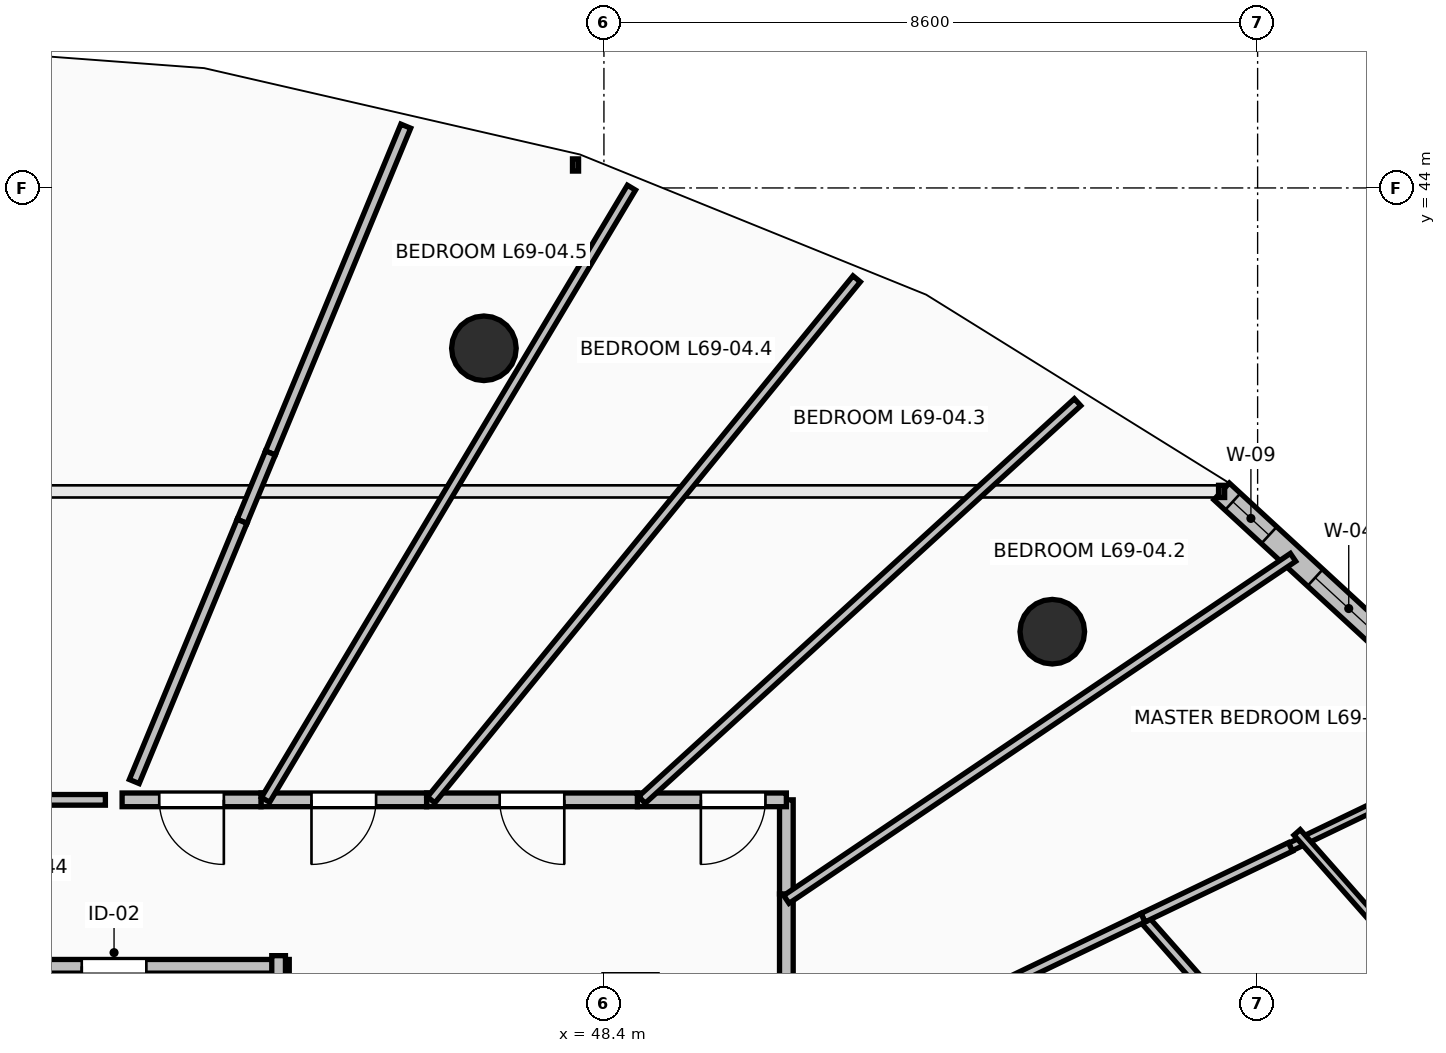
"""IFC4 building model, lengths in metres.
Left out: names, types, materials, properties, quantities, classifications, styles, units other than length and angle.
Written with IfcOpenShell. Run it as: python <this file> out.ifc"""

import sys

from ifc_helpers import new_model, si_unit, direction, frame, frame_2d, origin, origin_2d, place, context, subcontext, project, spatial, rectangle, circle, extrude, element, fill, save


model = new_model("IFC4")
c1 = context("Model", 3, precision=1e-05, world=origin(), true_north=direction((0.0, 1.0)))
c2 = subcontext(c1, "Body", "Model", "MODEL_VIEW")
j1 = project(units=[si_unit("LENGTHUNIT", "METRE"), si_unit("PLANEANGLEUNIT", "RADIAN")], contexts=[c1])
p1 = place(None, origin())
s1 = spatial("IfcSite", under=j1, at=p1, CompositionType="ELEMENT")
p2 = place(p1, origin())
s2 = spatial("IfcBuilding", under=s1, at=p2, CompositionType="ELEMENT")
p3 = place(p2, frame((0.0, 0.0, 255.55)))
s3 = spatial("IfcBuildingStorey", under=s2, at=p3, CompositionType="ELEMENT", Elevation=255.55)
for number, where, z_axis, x_axis in (
    (1, (54.299, 38.162, 0.0), (0.0, 0.0, 1.0), (0.707, 0.707, 0.0)),
    (2, (46.821, 41.891, 0.0), (0.0, 0.0, 1.0), (0.383, 0.924, 0.0)),
):
    element("IfcColumn", number, at=place(p3, frame(where, z_axis=z_axis, x_axis=x_axis)), inside=s3, PredefinedType="COLUMN", context=c2, shape_type="SweptSolid", body=[
        extrude(circle(Radius=0.425, at=origin_2d()), origin(), (0.0, 0.0, 1.0), 3.55),
    ])
p4 = place(p3, frame((59.784, 37.006, 0.0), z_axis=(0.0, 0.0, 1.0), x_axis=(-0.735445373611, 0.677584018727, 0.0)))
e3 = element("IfcWall", 3, at=p4, inside=s3, PredefinedType="STANDARD", context=c2, shape_type="SweptSolid", body=[
    extrude(rectangle(XDim=4.43, YDim=0.3, at=frame_2d((2.215, 0.0))), origin(), (0.0, 0.0, 1.0), 3.29),
])
p5 = place(p4, frame((1.556, 0.0, 0.85)))
e4 = element("IfcOpeningElement", 4, at=p5, cuts=e3, PredefinedType="OPENING", context=c2, shape_type="SweptSolid", body=[
    extrude(rectangle(XDim=1.2, YDim=1.95, at=frame_2d((0.6, 0.975))), frame((0.0, 0.165, 0.0), z_axis=(0.0, -1.0, 0.0), x_axis=(1.0, 0.0, 0.0)), (0.0, 0.0, 1.0), 0.33),
])
p6 = place(p4, frame((3.581, 0.0, 0.85)))
e5 = element("IfcOpeningElement", 5, at=p6, cuts=e3, PredefinedType="OPENING", context=c2, shape_type="SweptSolid", body=[
    extrude(rectangle(XDim=0.65, YDim=1.8, at=frame_2d((0.325, 0.9))), frame((0.0, 0.165, 0.0), z_axis=(0.0, -1.0, 0.0), x_axis=(1.0, 0.0, 0.0)), (0.0, 0.0, 1.0), 0.33),
])
p7 = place(p3, frame((44.26, 33.76, 0.0), z_axis=(0.0, 0.0, 1.0), x_axis=(-1.0, 0.0, 0.0)))
e6 = element("IfcWall", 6, at=p7, inside=s3, PredefinedType="PARTITIONING", context=c2, shape_type="SweptSolid", body=[
    extrude(rectangle(XDim=4.61, YDim=0.18, at=frame_2d((2.305, 0.0))), origin(), (0.0, 0.0, 1.0), 3.29),
])
p8 = place(p7, frame((1.88, 0.0, 0.0)))
e7 = element("IfcOpeningElement", 7, at=p8, cuts=e6, PredefinedType="OPENING", context=c2, shape_type="SweptSolid", body=[
    extrude(rectangle(XDim=0.85, YDim=2.1, at=frame_2d((0.425, 1.05))), frame((0.0, 0.105, 0.0), z_axis=(0.0, -1.0, 0.0), x_axis=(1.0, 0.0, 0.0)), (0.0, 0.0, 1.0), 0.21),
])
p9 = place(p3, frame((44.12, 32.97, 0.0), z_axis=(0.0, 0.0, 1.0), x_axis=(0.0, 1.0, 0.0)))
e8 = element("IfcWall", 8, at=p9, inside=s3, PredefinedType="PARTITIONING", context=c2, shape_type="SweptSolid", body=[
    extrude(rectangle(XDim=0.93, YDim=0.18, at=frame_2d((0.465, 0.0))), origin(), (0.0, 0.0, 1.0), 3.29),
])
p10 = place(p3, frame((50.8, 32.213, 0.0), z_axis=(0.0, 0.0, 1.0), x_axis=(0.0, 1.0, 0.0)))
e9 = element("IfcWall", 9, at=p10, inside=s3, PredefinedType="PARTITIONING", context=c2, shape_type="SweptSolid", body=[
    extrude(rectangle(XDim=2.499, YDim=0.18, at=frame_2d((1.25, 0.0))), origin(), (0.0, 0.0, 1.0), 2.482),
])
p11 = place(p3, frame((50.8, 34.712, 0.0), z_axis=(0.0, 0.0, 1.0), x_axis=(0.0, 1.0, 0.0)))
e10 = element("IfcWall", 10, at=p11, inside=s3, PredefinedType="PARTITIONING", context=c2, shape_type="SweptSolid", body=[
    extrude(rectangle(XDim=1.238, YDim=0.18, at=frame_2d((0.619, 0.0))), origin(), (0.0, 0.0, 1.0), 2.482),
])
p12 = place(p3, frame((50.8, 35.95, 0.0), z_axis=(0.0, 0.0, 1.0), x_axis=(-1.0, 0.0, 0.0)))
e11 = element("IfcWall", 11, at=p12, inside=s3, PredefinedType="PARTITIONING", context=c2, shape_type="SweptSolid", body=[
    extrude(rectangle(XDim=1.96, YDim=0.18, at=frame_2d((0.98, 0.0))), origin(), (0.0, 0.0, 1.0), 2.936),
])
p13 = place(p12, frame((0.275, 0.0, 0.0)))
e12 = element("IfcOpeningElement", 12, at=p13, cuts=e11, PredefinedType="OPENING", context=c2, shape_type="SweptSolid", body=[
    extrude(rectangle(XDim=0.85, YDim=2.1, at=frame_2d((0.425, 1.05))), frame((0.0, 0.105, 0.0), z_axis=(0.0, -1.0, 0.0), x_axis=(1.0, 0.0, 0.0)), (0.0, 0.0, 1.0), 0.21),
])
p14 = place(p3, frame((48.84, 35.95, 0.0), z_axis=(0.0, 0.0, 1.0), x_axis=(-1.0, 0.0, 0.0)))
e13 = element("IfcWall", 13, at=p14, inside=s3, PredefinedType="PARTITIONING", context=c2, shape_type="SweptSolid", body=[
    extrude(rectangle(XDim=2.773, YDim=0.18, at=frame_2d((1.387, 0.0))), origin(), (0.0, 0.0, 1.0), 2.482),
])
p15 = place(p14, frame((0.961, 0.0, 0.0)))
e14 = element("IfcOpeningElement", 14, at=p15, cuts=e13, PredefinedType="OPENING", context=c2, shape_type="SweptSolid", body=[
    extrude(rectangle(XDim=0.85, YDim=2.1, at=frame_2d((0.425, 1.05))), frame((0.0, 0.105, 0.0), z_axis=(0.0, -1.0, 0.0), x_axis=(1.0, 0.0, 0.0)), (0.0, 0.0, 1.0), 0.21),
])
p16 = place(p3, frame((46.067, 35.95, 0.0), z_axis=(0.0, 0.0, 1.0), x_axis=(-1.0, 0.0, 0.0)))
e15 = element("IfcWall", 15, at=p16, inside=s3, PredefinedType="PARTITIONING", context=c2, shape_type="SweptSolid", body=[
    extrude(rectangle(XDim=2.179, YDim=0.18, at=frame_2d((1.089, 0.0))), origin(), (0.0, 0.0, 1.0), 3.29),
])
p17 = place(p16, frame((0.665, 0.0, 0.0)))
e16 = element("IfcOpeningElement", 16, at=p17, cuts=e15, PredefinedType="OPENING", context=c2, shape_type="SweptSolid", body=[
    extrude(rectangle(XDim=0.85, YDim=2.1, at=frame_2d((0.425, 1.05))), frame((0.0, 0.105, 0.0), z_axis=(0.0, -1.0, 0.0), x_axis=(1.0, 0.0, 0.0)), (0.0, 0.0, 1.0), 0.21),
])
p18 = place(p3, frame((43.888, 35.95, 0.0), z_axis=(0.0, 0.0, 1.0), x_axis=(-1.0, 0.0, 0.0)))
e17 = element("IfcWall", 17, at=p18, inside=s3, PredefinedType="PARTITIONING", context=c2, shape_type="SweptSolid", body=[
    extrude(rectangle(XDim=1.827, YDim=0.18, at=frame_2d((0.914, 0.0))), origin(), (0.0, 0.0, 1.0), 3.29),
])
p19 = place(p18, frame((0.489, 0.0, 0.0)))
e18 = element("IfcOpeningElement", 18, at=p19, cuts=e17, PredefinedType="OPENING", context=c2, shape_type="SweptSolid", body=[
    extrude(rectangle(XDim=0.85, YDim=2.1, at=frame_2d((0.425, 1.05))), frame((0.0, 0.105, 0.0), z_axis=(0.0, -1.0, 0.0), x_axis=(1.0, 0.0, 0.0)), (0.0, 0.0, 1.0), 0.21),
])
p20 = place(p3, frame((57.432, 35.33, 0.0), z_axis=(0.0, 0.0, 1.0), x_axis=(0.90133305384, 0.43312668592, 0.0)))
e19 = element("IfcWall", 19, at=p20, inside=s3, PredefinedType="PARTITIONING", context=c2, shape_type="SweptSolid", body=[
    extrude(rectangle(XDim=3.069, YDim=0.11, at=frame_2d((1.535, 0.0))), origin(), (0.0, 0.0, 1.0), 3.29),
])
p21 = place(p3, frame((57.512, 32.112, 0.0), z_axis=(0.0, 0.0, 1.0), x_axis=(-0.662026430628, 0.749480490173, 0.0)))
e20 = element("IfcWall", 20, at=p21, inside=s3, PredefinedType="PARTITIONING", context=c2, shape_type="SweptSolid", body=[
    extrude(rectangle(XDim=3.051, YDim=0.125, at=frame_2d((1.526, 0.0))), origin(), (0.0, 0.0, 1.0), 2.482),
])
p22 = place(p21, frame((1.076, 0.0, 0.0)))
e21 = element("IfcOpeningElement", 21, at=p22, cuts=e20, PredefinedType="OPENING", context=c2, shape_type="SweptSolid", body=[
    extrude(rectangle(XDim=0.9, YDim=2.1, at=frame_2d((0.45, 1.05))), frame((0.0, 0.077, 0.0), z_axis=(0.0, -1.0, 0.0), x_axis=(1.0, 0.0, 0.0)), (0.0, 0.0, 1.0), 0.155),
])
p23 = place(p3, frame((55.492, 34.399, 0.0), z_axis=(0.0, 0.0, 1.0), x_axis=(0.901372521065, 0.433044545363, 0.0)))
e22 = element("IfcWall", 22, at=p23, inside=s3, PredefinedType="PARTITIONING", context=c2, shape_type="SweptSolid", body=[
    extrude(rectangle(XDim=2.152, YDim=0.125, at=frame_2d((1.076, 0.0))), origin(), (0.0, 0.0, 1.0), 2.874),
])
p24 = place(p3, frame((55.492, 34.399, 0.0), z_axis=(0.0, 0.0, 1.0), x_axis=(-0.901416162018, -0.432953695968, 0.0)))
e23 = element("IfcWall", 23, at=p24, inside=s3, PredefinedType="PARTITIONING", context=c2, shape_type="SweptSolid", body=[
    extrude(rectangle(XDim=5.205, YDim=0.125, at=frame_2d((2.603, 0.0))), origin(), (0.0, 0.0, 1.0), 2.482),
])
p25 = place(p24, frame((2.152, 0.0, 0.0)))
e24 = element("IfcOpeningElement", 24, at=p25, cuts=e23, PredefinedType="OPENING", context=c2, shape_type="SweptSolid", body=[
    extrude(rectangle(XDim=0.9, YDim=2.1, at=frame_2d((0.45, 1.05))), frame((0.0, 0.077, 0.0), z_axis=(0.0, -1.0, 0.0), x_axis=(1.0, 0.0, 0.0)), (0.0, 0.0, 1.0), 0.155),
])
p26 = place(p3, frame((57.519, 35.522, 0.0), z_axis=(0.0, 0.0, 1.0), x_axis=(0.662055665853, -0.749454665281, 0.0)))
e25 = element("IfcWall", 25, at=p26, inside=s3, PredefinedType="PARTITIONING", context=c2, shape_type="SweptSolid", body=[
    extrude(rectangle(XDim=3.701, YDim=0.11, at=frame_2d((1.851, 0.0))), origin(), (0.0, 0.0, 1.0), 3.29),
])
p27 = place(p3, frame((57.466, 39.14, 0.0), z_axis=(0.0, 0.0, 1.0), x_axis=(-0.828823335801, -0.559510391352, 0.0)))
e26 = element("IfcWall", 26, at=p27, inside=s3, PredefinedType="PARTITIONING", context=c2, shape_type="SweptSolid", body=[
    extrude(rectangle(XDim=8.043, YDim=0.125, at=frame_2d((4.021, 0.0))), origin(), (0.0, 0.0, 1.0), 2.482),
])
p28 = place(p3, frame((54.631, 41.181, 0.0), z_axis=(0.0, 0.0, 1.0), x_axis=(-0.73860604902, -0.674137303783, 0.0)))
e27 = element("IfcWall", 27, at=p28, inside=s3, PredefinedType="PARTITIONING", context=c2, shape_type="SweptSolid", body=[
    extrude(rectangle(XDim=7.76, YDim=0.125, at=frame_2d((3.88, 0.0))), origin(), (0.0, 0.0, 1.0), 2.874),
])
p29 = place(p3, frame((51.725, 42.804, 0.0), z_axis=(0.0, 0.0, 1.0), x_axis=(-0.632582563989, -0.774492930721, 0.0)))
e28 = element("IfcWall", 28, at=p29, inside=s3, PredefinedType="PARTITIONING", context=c2, shape_type="SweptSolid", body=[
    extrude(rectangle(XDim=8.85, YDim=0.125, at=frame_2d((4.425, 0.0))), origin(), (0.0, 0.0, 1.0), 2.482),
])
p30 = place(p3, frame((48.762, 44.004, 0.0), z_axis=(0.0, 0.0, 1.0), x_axis=(-0.51305247577, -0.858357243289, 0.0)))
e29 = element("IfcWall", 29, at=p30, inside=s3, PredefinedType="PARTITIONING", context=c2, shape_type="SweptSolid", body=[
    extrude(rectangle(XDim=9.383, YDim=0.125, at=frame_2d((4.691, 0.0))), origin(), (0.0, 0.0, 1.0), 2.482),
])
p31 = place(p3, frame((41.841, 35.95, 0.0), z_axis=(0.0, 0.0, 1.0), x_axis=(-1.0, 0.0, 0.0)))
e30 = element("IfcWall", 30, at=p31, inside=s3, PredefinedType="PARTITIONING", context=c2, shape_type="SweptSolid", body=[
    extrude(rectangle(XDim=2.391, YDim=0.14, at=frame_2d((1.196, 0.0))), origin(), (0.0, 0.0, 1.0), 3.29),
])
p32 = place(p3, frame((45.793, 44.813, 0.0), z_axis=(0.0, 0.0, 1.0), x_axis=(-0.382733290986, -0.923858878818, 0.0)))
e31 = element("IfcWall", 31, at=p32, inside=s3, PredefinedType="PARTITIONING", context=c2, shape_type="SweptSolid", body=[
    extrude(rectangle(XDim=4.653, YDim=0.14, at=frame_2d((2.327, 0.0))), origin(), (0.0, 0.0, 1.0), 2.874),
])
p33 = place(p3, frame((44.012, 40.514, 0.0), z_axis=(0.0, 0.0, 1.0), x_axis=(-0.382941999237, -0.923772388211, 0.0)))
e32 = element("IfcWall", 32, at=p33, inside=s3, PredefinedType="PARTITIONING", context=c2, shape_type="SweptSolid", body=[
    extrude(rectangle(XDim=0.974, YDim=0.14, at=frame_2d((0.487, 0.0))), origin(), (0.0, 0.0, 1.0), 3.29),
])
p34 = place(p3, frame((43.639, 39.614, 0.0), z_axis=(0.0, 0.0, 1.0), x_axis=(-0.38270095978, -0.923872272224, 0.0)))
e33 = element("IfcWall", 33, at=p34, inside=s3, PredefinedType="PARTITIONING", context=c2, shape_type="SweptSolid", body=[
    extrude(rectangle(XDim=3.705, YDim=0.14, at=frame_2d((1.853, 0.0))), origin(), (0.0, 0.0, 1.0), 2.936),
])
p35 = place(p5, origin())
e34 = element("IfcWindow", 34, at=p35, inside=s3, PartitioningType="SINGLE_PANEL", PredefinedType="WINDOW", context=c2, shape_type="SweptSolid", body=[
    extrude(rectangle(XDim=1.2, YDim=1.95, at=frame_2d((0.6, 0.975))), frame((0.0, 0.03, 0.0), z_axis=(0.0, -1.0, 0.0), x_axis=(1.0, 0.0, 0.0)), (0.0, 0.0, 1.0), 0.06),
])
fill(e4, e34)
p36 = place(p6, origin())
e35 = element("IfcWindow", 35, at=p36, inside=s3, PartitioningType="SINGLE_PANEL", PredefinedType="WINDOW", context=c2, shape_type="SweptSolid", body=[
    extrude(rectangle(XDim=0.65, YDim=1.8, at=frame_2d((0.325, 0.9))), frame((0.0, 0.03, 0.0), z_axis=(0.0, -1.0, 0.0), x_axis=(1.0, 0.0, 0.0)), (0.0, 0.0, 1.0), 0.06),
])
fill(e5, e35)
p37 = place(p8, origin())
e36 = element("IfcDoor", 36, at=p37, inside=s3, OperationType="SINGLE_SWING_RIGHT", PredefinedType="DOOR", context=c2, shape_type="SweptSolid", body=[
    extrude(rectangle(XDim=0.85, YDim=2.1, at=frame_2d((0.425, 1.05))), frame((0.0, 0.025, 0.0), z_axis=(0.0, -1.0, 0.0), x_axis=(1.0, 0.0, 0.0)), (0.0, 0.0, 1.0), 0.05),
])
fill(e7, e36)
p38 = place(p13, origin())
e37 = element("IfcDoor", 37, at=p38, inside=s3, OperationType="SINGLE_SWING_RIGHT", PredefinedType="DOOR", context=c2, shape_type="SweptSolid", body=[
    extrude(rectangle(XDim=0.85, YDim=2.1, at=frame_2d((0.425, 1.05))), frame((0.0, 0.025, 0.0), z_axis=(0.0, -1.0, 0.0), x_axis=(1.0, 0.0, 0.0)), (0.0, 0.0, 1.0), 0.05),
])
fill(e12, e37)
p39 = place(p15, origin())
e38 = element("IfcDoor", 38, at=p39, inside=s3, OperationType="SINGLE_SWING_LEFT", PredefinedType="DOOR", context=c2, shape_type="SweptSolid", body=[
    extrude(rectangle(XDim=0.85, YDim=2.1, at=frame_2d((0.425, 1.05))), frame((0.0, 0.025, 0.0), z_axis=(0.0, -1.0, 0.0), x_axis=(1.0, 0.0, 0.0)), (0.0, 0.0, 1.0), 0.05),
])
fill(e14, e38)
p40 = place(p17, origin())
e39 = element("IfcDoor", 39, at=p40, inside=s3, OperationType="SINGLE_SWING_RIGHT", PredefinedType="DOOR", context=c2, shape_type="SweptSolid", body=[
    extrude(rectangle(XDim=0.85, YDim=2.1, at=frame_2d((0.425, 1.05))), frame((0.0, 0.025, 0.0), z_axis=(0.0, -1.0, 0.0), x_axis=(1.0, 0.0, 0.0)), (0.0, 0.0, 1.0), 0.05),
])
fill(e16, e39)
p41 = place(p19, origin())
e40 = element("IfcDoor", 40, at=p41, inside=s3, OperationType="SINGLE_SWING_LEFT", PredefinedType="DOOR", context=c2, shape_type="SweptSolid", body=[
    extrude(rectangle(XDim=0.85, YDim=2.1, at=frame_2d((0.425, 1.05))), frame((0.0, 0.025, 0.0), z_axis=(0.0, -1.0, 0.0), x_axis=(1.0, 0.0, 0.0)), (0.0, 0.0, 1.0), 0.05),
])
fill(e18, e40)
save(model, sys.argv[1])
